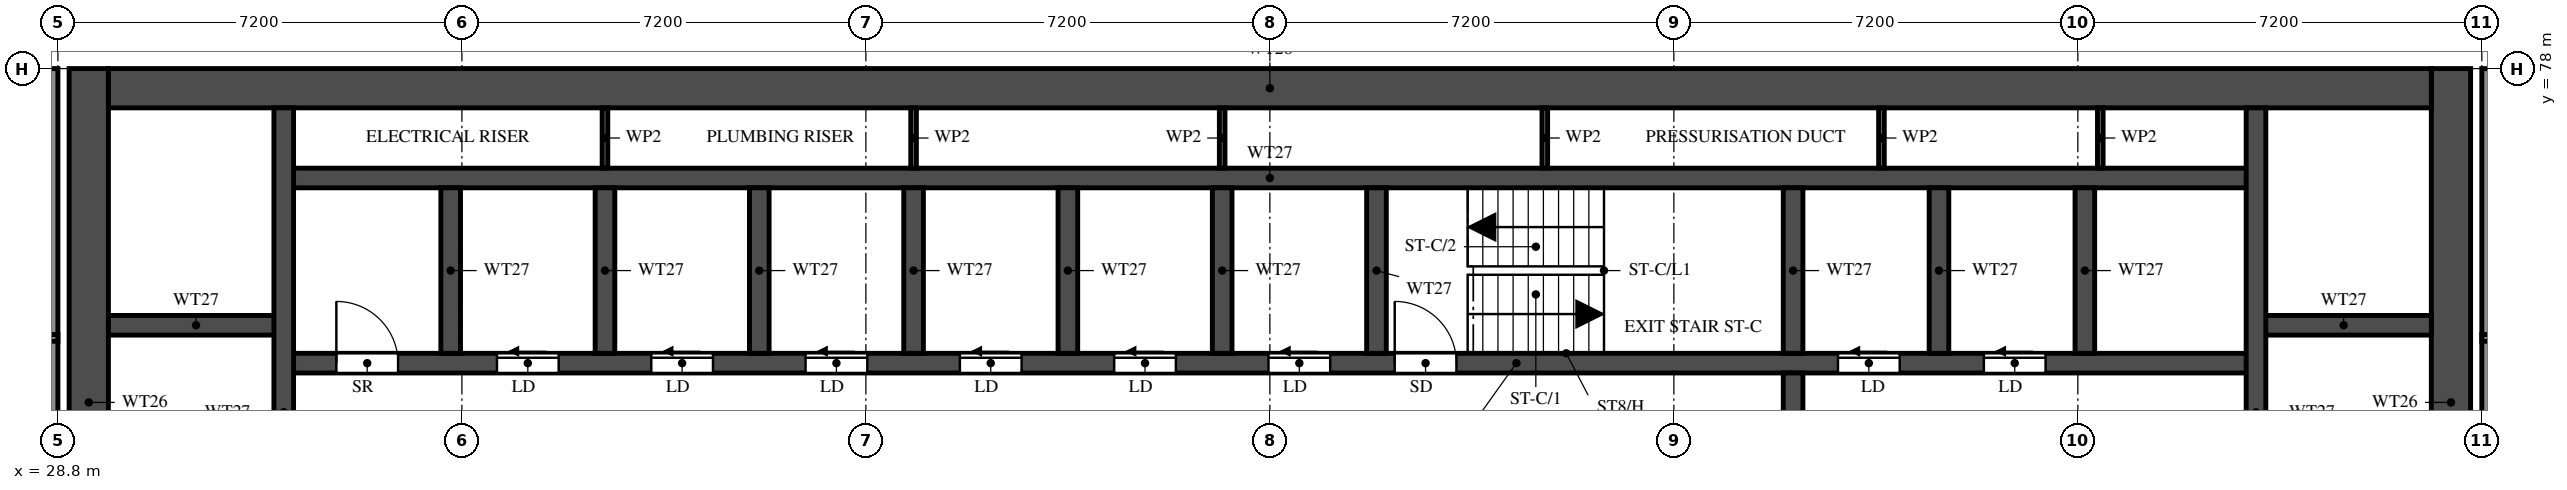
"""IFC4 building model, lengths in metres.
Left out: names, types, materials, properties, quantities, classifications, styles, units other than length and angle.
Written with IfcOpenShell. Run it as: python <this file> out.ifc"""

import sys

from ifc_helpers import new_model, si_unit, direction, frame, frame_2d, origin, place, context, subcontext, project, spatial, rectangle, extrude, element, fill, save


model = new_model("IFC4")
c1 = context("Model", 3, precision=1e-05, world=origin(), true_north=direction((0.0, 1.0)))
c2 = subcontext(c1, "Body", "Model", "MODEL_VIEW")
j1 = project(units=[si_unit("LENGTHUNIT", "METRE"), si_unit("PLANEANGLEUNIT", "RADIAN")], contexts=[c1])
p1 = place(None, origin())
s1 = spatial("IfcSite", under=j1, at=p1, CompositionType="ELEMENT")
p2 = place(p1, origin())
s2 = spatial("IfcBuilding", under=s1, at=p2, CompositionType="ELEMENT")
p3 = place(p2, frame((0.0, 0.0, 195.5)))
s3 = spatial("IfcBuildingStorey", under=s2, at=p3, CompositionType="ELEMENT", Elevation=195.5)
for number, where, z_axis, x_axis in (
    (1, (29.35, 66.1, 0.0), (0.0, 0.0, 1.0), (0.0, 1.0, 0.0)),
    (2, (71.45, 66.1, 0.0), (0.0, 0.0, 1.0), (0.0, 1.0, 0.0)),
):
    element("IfcWall", number, at=place(p3, frame(where, z_axis=z_axis, x_axis=x_axis)), inside=s3, PredefinedType="SHEAR", context=c2, shape_type="SweptSolid", body=[
        extrude(rectangle(XDim=11.9, YDim=0.7, at=frame_2d((5.95, 0.0))), origin(), (0.0, 0.0, 1.0), 3.2),
    ])
p4 = place(p3, frame((29.7, 77.65, 0.0), z_axis=(0.0, 0.0, 1.0), x_axis=(1.0, 0.0, 0.0)))
e3 = element("IfcWall", 3, at=p4, inside=s3, PredefinedType="SHEAR", context=c2, shape_type="SweptSolid", body=[
    extrude(rectangle(XDim=41.4, YDim=0.7, at=frame_2d((20.7, 0.0))), origin(), (0.0, 0.0, 1.0), 3.2),
])
p5 = place(p3, frame((32.825, 72.75, 0.0), z_axis=(0.0, 0.0, 1.0), x_axis=(1.0, 0.0, 0.0)))
e4 = element("IfcWall", 4, at=p5, inside=s3, PredefinedType="SHEAR", context=c2, shape_type="SweptSolid", body=[
    extrude(rectangle(XDim=35.15, YDim=0.35, at=frame_2d((17.575, 0.0))), origin(), (0.0, 0.0, 1.0), 3.2),
])
p6 = place(p5, frame((19.8, 0.0, 0.0)))
e5 = element("IfcOpeningElement", 5, at=p6, cuts=e4, PredefinedType="OPENING", context=c2, shape_type="SweptSolid", body=[
    extrude(rectangle(XDim=1.1, YDim=2.1, at=frame_2d((0.55, 1.05))), frame((0.0, 0.185, 0.0), z_axis=(0.0, -1.0, 0.0), x_axis=(1.0, 0.0, 0.0)), (0.0, 0.0, 1.0), 0.37),
])
p7 = place(p5, frame((27.7, 0.0, 0.0)))
e6 = element("IfcOpeningElement", 6, at=p7, cuts=e4, PredefinedType="OPENING", context=c2, shape_type="SweptSolid", body=[
    extrude(rectangle(XDim=1.1, YDim=2.1, at=frame_2d((0.55, 1.05))), frame((0.0, 0.185, 0.0), z_axis=(0.0, -1.0, 0.0), x_axis=(1.0, 0.0, 0.0)), (0.0, 0.0, 1.0), 0.37),
])
p8 = place(p5, frame((30.3, 0.0, 0.0)))
e7 = element("IfcOpeningElement", 7, at=p8, cuts=e4, PredefinedType="OPENING", context=c2, shape_type="SweptSolid", body=[
    extrude(rectangle(XDim=1.1, YDim=2.1, at=frame_2d((0.55, 1.05))), frame((0.0, 0.185, 0.0), z_axis=(0.0, -1.0, 0.0), x_axis=(1.0, 0.0, 0.0)), (0.0, 0.0, 1.0), 0.37),
])
p9 = place(p5, frame((3.8, 0.0, 0.0)))
e8 = element("IfcOpeningElement", 8, at=p9, cuts=e4, PredefinedType="OPENING", context=c2, shape_type="SweptSolid", body=[
    extrude(rectangle(XDim=1.1, YDim=2.1, at=frame_2d((0.55, 1.05))), frame((0.0, 0.185, 0.0), z_axis=(0.0, -1.0, 0.0), x_axis=(1.0, 0.0, 0.0)), (0.0, 0.0, 1.0), 0.37),
])
p10 = place(p5, frame((6.55, 0.0, 0.0)))
e9 = element("IfcOpeningElement", 9, at=p10, cuts=e4, PredefinedType="OPENING", context=c2, shape_type="SweptSolid", body=[
    extrude(rectangle(XDim=1.1, YDim=2.1, at=frame_2d((0.55, 1.05))), frame((0.0, 0.185, 0.0), z_axis=(0.0, -1.0, 0.0), x_axis=(1.0, 0.0, 0.0)), (0.0, 0.0, 1.0), 0.37),
])
p11 = place(p5, frame((9.3, 0.0, 0.0)))
e10 = element("IfcOpeningElement", 10, at=p11, cuts=e4, PredefinedType="OPENING", context=c2, shape_type="SweptSolid", body=[
    extrude(rectangle(XDim=1.1, YDim=2.1, at=frame_2d((0.55, 1.05))), frame((0.0, 0.185, 0.0), z_axis=(0.0, -1.0, 0.0), x_axis=(1.0, 0.0, 0.0)), (0.0, 0.0, 1.0), 0.37),
])
p12 = place(p5, frame((12.05, 0.0, 0.0)))
e11 = element("IfcOpeningElement", 11, at=p12, cuts=e4, PredefinedType="OPENING", context=c2, shape_type="SweptSolid", body=[
    extrude(rectangle(XDim=1.1, YDim=2.1, at=frame_2d((0.55, 1.05))), frame((0.0, 0.185, 0.0), z_axis=(0.0, -1.0, 0.0), x_axis=(1.0, 0.0, 0.0)), (0.0, 0.0, 1.0), 0.37),
])
p13 = place(p5, frame((14.8, 0.0, 0.0)))
e12 = element("IfcOpeningElement", 12, at=p13, cuts=e4, PredefinedType="OPENING", context=c2, shape_type="SweptSolid", body=[
    extrude(rectangle(XDim=1.1, YDim=2.1, at=frame_2d((0.55, 1.05))), frame((0.0, 0.185, 0.0), z_axis=(0.0, -1.0, 0.0), x_axis=(1.0, 0.0, 0.0)), (0.0, 0.0, 1.0), 0.37),
])
p14 = place(p5, frame((17.55, 0.0, 0.0)))
e13 = element("IfcOpeningElement", 13, at=p14, cuts=e4, PredefinedType="OPENING", context=c2, shape_type="SweptSolid", body=[
    extrude(rectangle(XDim=1.1, YDim=2.1, at=frame_2d((0.55, 1.05))), frame((0.0, 0.185, 0.0), z_axis=(0.0, -1.0, 0.0), x_axis=(1.0, 0.0, 0.0)), (0.0, 0.0, 1.0), 0.37),
])
p15 = place(p5, frame((0.938, 0.0, 0.0)))
e14 = element("IfcOpeningElement", 14, at=p15, cuts=e4, PredefinedType="OPENING", context=c2, shape_type="SweptSolid", body=[
    extrude(rectangle(XDim=1.1, YDim=2.1, at=frame_2d((0.55, 1.05))), frame((0.0, 0.185, 0.0), z_axis=(0.0, -1.0, 0.0), x_axis=(1.0, 0.0, 0.0)), (0.0, 0.0, 1.0), 0.37),
])
p16 = place(p3, frame((32.825, 76.05, 0.0), z_axis=(0.0, 0.0, 1.0), x_axis=(1.0, 0.0, 0.0)))
e15 = element("IfcWall", 15, at=p16, inside=s3, PredefinedType="SHEAR", context=c2, shape_type="SweptSolid", body=[
    extrude(rectangle(XDim=35.15, YDim=0.35, at=frame_2d((17.575, 0.0))), origin(), (0.0, 0.0, 1.0), 3.2),
])
for number, where, z_axis, x_axis in (
    (16, (29.7, 73.425, 0.0), (0.0, 0.0, 1.0), (1.0, 0.0, 0.0)),
    (17, (67.975, 73.425, 0.0), (0.0, 0.0, 1.0), (1.0, 0.0, 0.0)),
):
    element("IfcWall", number, at=place(p3, frame(where, z_axis=z_axis, x_axis=x_axis)), inside=s3, PredefinedType="SHEAR", context=c2, shape_type="SweptSolid", body=[
        extrude(rectangle(XDim=3.125, YDim=0.35, at=frame_2d((1.562, 0.0))), origin(), (0.0, 0.0, 1.0), 3.2),
    ])
p17 = place(p3, frame((32.825, 66.45, 0.0), z_axis=(0.0, 0.0, 1.0), x_axis=(0.0, 1.0, 0.0)))
e18 = element("IfcWall", 18, at=p17, inside=s3, PredefinedType="SHEAR", context=c2, shape_type="SweptSolid", body=[
    extrude(rectangle(XDim=10.85, YDim=0.35, at=frame_2d((5.425, 0.0))), origin(), (0.0, 0.0, 1.0), 3.2),
])
p18 = place(p3, frame((67.975, 66.45, 0.0), z_axis=(0.0, 0.0, 1.0), x_axis=(0.0, 1.0, 0.0)))
e19 = element("IfcWall", 19, at=p18, inside=s3, PredefinedType="SHEAR", context=c2, shape_type="SweptSolid", body=[
    extrude(rectangle(XDim=10.85, YDim=0.35, at=frame_2d((5.425, 0.0))), origin(), (0.0, 0.0, 1.0), 3.2),
])
p19 = place(p18, frame((0.15, 0.0, 0.0)))
e20 = element("IfcOpeningElement", 20, at=p19, cuts=e19, PredefinedType="OPENING", context=c2, shape_type="SweptSolid", body=[
    extrude(rectangle(XDim=1.1, YDim=2.1, at=frame_2d((0.55, 1.05))), frame((0.0, 0.185, 0.0), z_axis=(0.0, -1.0, 0.0), x_axis=(1.0, 0.0, 0.0)), (0.0, 0.0, 1.0), 0.37),
])
p20 = place(p3, frame((59.725, 66.45, 0.0), z_axis=(0.0, 0.0, 1.0), x_axis=(0.0, 1.0, 0.0)))
e21 = element("IfcWall", 21, at=p20, inside=s3, PredefinedType="SHEAR", context=c2, shape_type="SweptSolid", body=[
    extrude(rectangle(XDim=6.125, YDim=0.35, at=frame_2d((3.062, 0.0))), origin(), (0.0, 0.0, 1.0), 3.2),
])
p21 = place(p20, frame((3.85, 0.0, 0.0)))
e22 = element("IfcOpeningElement", 22, at=p21, cuts=e21, PredefinedType="OPENING", context=c2, shape_type="SweptSolid", body=[
    extrude(rectangle(XDim=1.2, YDim=2.1, at=frame_2d((0.6, 1.05))), frame((0.0, 0.185, 0.0), z_axis=(0.0, -1.0, 0.0), x_axis=(1.0, 0.0, 0.0)), (0.0, 0.0, 1.0), 0.37),
])
for number, where, z_axis, x_axis in (
    (23, (59.725, 72.925, 0.0), (0.0, 0.0, 1.0), (0.0, 1.0, 0.0)),
    (24, (35.8, 72.925, 0.0), (0.0, 0.0, 1.0), (0.0, 1.0, 0.0)),
    (25, (38.55, 72.925, 0.0), (0.0, 0.0, 1.0), (0.0, 1.0, 0.0)),
    (26, (41.3, 72.925, 0.0), (0.0, 0.0, 1.0), (0.0, 1.0, 0.0)),
    (27, (44.05, 72.925, 0.0), (0.0, 0.0, 1.0), (0.0, 1.0, 0.0)),
    (28, (46.8, 72.925, 0.0), (0.0, 0.0, 1.0), (0.0, 1.0, 0.0)),
    (29, (49.55, 72.925, 0.0), (0.0, 0.0, 1.0), (0.0, 1.0, 0.0)),
    (30, (52.3, 72.925, 0.0), (0.0, 0.0, 1.0), (0.0, 1.0, 0.0)),
    (31, (62.325, 72.925, 0.0), (0.0, 0.0, 1.0), (0.0, 1.0, 0.0)),
    (32, (64.925, 72.925, 0.0), (0.0, 0.0, 1.0), (0.0, 1.0, 0.0)),
):
    element("IfcWall", number, at=place(p3, frame(where, z_axis=z_axis, x_axis=x_axis)), inside=s3, PredefinedType="SHEAR", context=c2, shape_type="SweptSolid", body=[
        extrude(rectangle(XDim=2.95, YDim=0.35, at=frame_2d((1.475, 0.0))), origin(), (0.0, 0.0, 1.0), 3.2),
    ])
for number, where, z_axis, x_axis in (
    (33, (38.55, 76.225, 0.0), (0.0, 0.0, 1.0), (0.0, 1.0, 0.0)),
    (34, (44.05, 76.225, 0.0), (0.0, 0.0, 1.0), (0.0, 1.0, 0.0)),
    (35, (49.55, 76.225, 0.0), (0.0, 0.0, 1.0), (0.0, 1.0, 0.0)),
    (36, (55.3, 76.225, 0.0), (0.0, 0.0, 1.0), (0.0, 1.0, 0.0)),
    (37, (61.3, 76.225, 0.0), (0.0, 0.0, 1.0), (0.0, 1.0, 0.0)),
    (38, (65.2, 76.225, 0.0), (0.0, 0.0, 1.0), (0.0, 1.0, 0.0)),
):
    element("IfcWall", number, at=place(p3, frame(where, z_axis=z_axis, x_axis=x_axis)), inside=s3, PredefinedType="PARTITIONING", context=c2, shape_type="SweptSolid", body=[
        extrude(rectangle(XDim=1.075, YDim=0.1, at=frame_2d((0.538, 0.0))), origin(), (0.0, 0.0, 1.0), 3.2),
    ])
for number, where, z_axis, x_axis in (
    (39, (28.7, 62.4, 0.0), (0.0, 0.0, 1.0), (0.0, 1.0, 0.0)),
    (40, (72.1, 62.4, 0.0), (0.0, 0.0, 1.0), (0.0, 1.0, 0.0)),
):
    element("IfcWall", number, at=place(p3, frame(where, z_axis=z_axis, x_axis=x_axis)), inside=s3, PredefinedType="SOLIDWALL", context=c2, shape_type="SweptSolid", body=[
        extrude(rectangle(XDim=15.6, YDim=0.2, at=frame_2d((7.8, 0.0))), origin(), (0.0, 0.0, 1.0), 3.2),
    ])
p22 = place(p3, frame((14.525, 73.2, 0.0), z_axis=(0.0, 0.0, 1.0), x_axis=(1.0, 0.0, 0.0)))
e41 = element("IfcWall", 41, at=p22, inside=s3, PredefinedType="PARTITIONING", context=c2, shape_type="SweptSolid", body=[
    extrude(rectangle(XDim=14.275, YDim=0.12, at=frame_2d((7.138, 0.0))), origin(), (0.0, 0.0, 1.0), 2.3),
])
p23 = place(p22, frame((7.675, 0.0, 0.0)))
e42 = element("IfcOpeningElement", 42, at=p23, cuts=e41, PredefinedType="OPENING", context=c2, shape_type="SweptSolid", body=[
    extrude(rectangle(XDim=0.9, YDim=2.1, at=frame_2d((0.45, 1.05))), frame((0.0, 0.07, 0.0), z_axis=(0.0, -1.0, 0.0), x_axis=(1.0, 0.0, 0.0)), (0.0, 0.0, 1.0), 0.14),
])
p24 = place(p3, frame((72.0, 73.2, 0.0), z_axis=(0.0, 0.0, 1.0), x_axis=(1.0, 0.0, 0.0)))
e43 = element("IfcWall", 43, at=p24, inside=s3, PredefinedType="PARTITIONING", context=c2, shape_type="SweptSolid", body=[
    extrude(rectangle(XDim=14.275, YDim=0.12, at=frame_2d((7.137, 0.0))), origin(), (0.0, 0.0, 1.0), 2.3),
])
p25 = place(p24, frame((5.7, 0.0, 0.0)))
e44 = element("IfcOpeningElement", 44, at=p25, cuts=e43, PredefinedType="OPENING", context=c2, shape_type="SweptSolid", body=[
    extrude(rectangle(XDim=0.9, YDim=2.1, at=frame_2d((0.45, 1.05))), frame((0.0, 0.07, 0.0), z_axis=(0.0, -1.0, 0.0), x_axis=(1.0, 0.0, 0.0)), (0.0, 0.0, 1.0), 0.14),
])
p26 = place(p6, origin())
e45 = element("IfcDoor", 45, at=p26, inside=s3, OperationType="SINGLE_SWING_LEFT", PredefinedType="DOOR", context=c2, shape_type="SweptSolid", body=[
    extrude(rectangle(XDim=1.1, YDim=2.1, at=frame_2d((0.55, 1.05))), frame((0.0, 0.025, 0.0), z_axis=(0.0, -1.0, 0.0), x_axis=(1.0, 0.0, 0.0)), (0.0, 0.0, 1.0), 0.05),
])
fill(e5, e45)
p27 = place(p7, origin())
e46 = element("IfcDoor", 46, at=p27, inside=s3, OperationType="SLIDING_TO_LEFT", PredefinedType="DOOR", context=c2, shape_type="SweptSolid", body=[
    extrude(rectangle(XDim=1.1, YDim=2.1, at=frame_2d((0.55, 1.05))), frame((0.0, 0.025, 0.0), z_axis=(0.0, -1.0, 0.0), x_axis=(1.0, 0.0, 0.0)), (0.0, 0.0, 1.0), 0.05),
])
fill(e6, e46)
p28 = place(p8, origin())
e47 = element("IfcDoor", 47, at=p28, inside=s3, OperationType="SLIDING_TO_LEFT", PredefinedType="DOOR", context=c2, shape_type="SweptSolid", body=[
    extrude(rectangle(XDim=1.1, YDim=2.1, at=frame_2d((0.55, 1.05))), frame((0.0, 0.025, 0.0), z_axis=(0.0, -1.0, 0.0), x_axis=(1.0, 0.0, 0.0)), (0.0, 0.0, 1.0), 0.05),
])
fill(e7, e47)
p29 = place(p9, origin())
e48 = element("IfcDoor", 48, at=p29, inside=s3, OperationType="SLIDING_TO_LEFT", PredefinedType="DOOR", context=c2, shape_type="SweptSolid", body=[
    extrude(rectangle(XDim=1.1, YDim=2.1, at=frame_2d((0.55, 1.05))), frame((0.0, 0.025, 0.0), z_axis=(0.0, -1.0, 0.0), x_axis=(1.0, 0.0, 0.0)), (0.0, 0.0, 1.0), 0.05),
])
fill(e8, e48)
p30 = place(p10, origin())
e49 = element("IfcDoor", 49, at=p30, inside=s3, OperationType="SLIDING_TO_LEFT", PredefinedType="DOOR", context=c2, shape_type="SweptSolid", body=[
    extrude(rectangle(XDim=1.1, YDim=2.1, at=frame_2d((0.55, 1.05))), frame((0.0, 0.025, 0.0), z_axis=(0.0, -1.0, 0.0), x_axis=(1.0, 0.0, 0.0)), (0.0, 0.0, 1.0), 0.05),
])
fill(e9, e49)
p31 = place(p11, origin())
e50 = element("IfcDoor", 50, at=p31, inside=s3, OperationType="SLIDING_TO_LEFT", PredefinedType="DOOR", context=c2, shape_type="SweptSolid", body=[
    extrude(rectangle(XDim=1.1, YDim=2.1, at=frame_2d((0.55, 1.05))), frame((0.0, 0.025, 0.0), z_axis=(0.0, -1.0, 0.0), x_axis=(1.0, 0.0, 0.0)), (0.0, 0.0, 1.0), 0.05),
])
fill(e10, e50)
p32 = place(p12, origin())
e51 = element("IfcDoor", 51, at=p32, inside=s3, OperationType="SLIDING_TO_LEFT", PredefinedType="DOOR", context=c2, shape_type="SweptSolid", body=[
    extrude(rectangle(XDim=1.1, YDim=2.1, at=frame_2d((0.55, 1.05))), frame((0.0, 0.025, 0.0), z_axis=(0.0, -1.0, 0.0), x_axis=(1.0, 0.0, 0.0)), (0.0, 0.0, 1.0), 0.05),
])
fill(e11, e51)
p33 = place(p13, origin())
e52 = element("IfcDoor", 52, at=p33, inside=s3, OperationType="SLIDING_TO_LEFT", PredefinedType="DOOR", context=c2, shape_type="SweptSolid", body=[
    extrude(rectangle(XDim=1.1, YDim=2.1, at=frame_2d((0.55, 1.05))), frame((0.0, 0.025, 0.0), z_axis=(0.0, -1.0, 0.0), x_axis=(1.0, 0.0, 0.0)), (0.0, 0.0, 1.0), 0.05),
])
fill(e12, e52)
p34 = place(p14, origin())
e53 = element("IfcDoor", 53, at=p34, inside=s3, OperationType="SLIDING_TO_LEFT", PredefinedType="DOOR", context=c2, shape_type="SweptSolid", body=[
    extrude(rectangle(XDim=1.1, YDim=2.1, at=frame_2d((0.55, 1.05))), frame((0.0, 0.025, 0.0), z_axis=(0.0, -1.0, 0.0), x_axis=(1.0, 0.0, 0.0)), (0.0, 0.0, 1.0), 0.05),
])
fill(e13, e53)
p35 = place(p15, origin())
e54 = element("IfcDoor", 54, at=p35, inside=s3, OperationType="SINGLE_SWING_LEFT", PredefinedType="DOOR", context=c2, shape_type="SweptSolid", body=[
    extrude(rectangle(XDim=1.1, YDim=2.1, at=frame_2d((0.55, 1.05))), frame((0.0, 0.025, 0.0), z_axis=(0.0, -1.0, 0.0), x_axis=(1.0, 0.0, 0.0)), (0.0, 0.0, 1.0), 0.05),
])
fill(e14, e54)
save(model, sys.argv[1])
